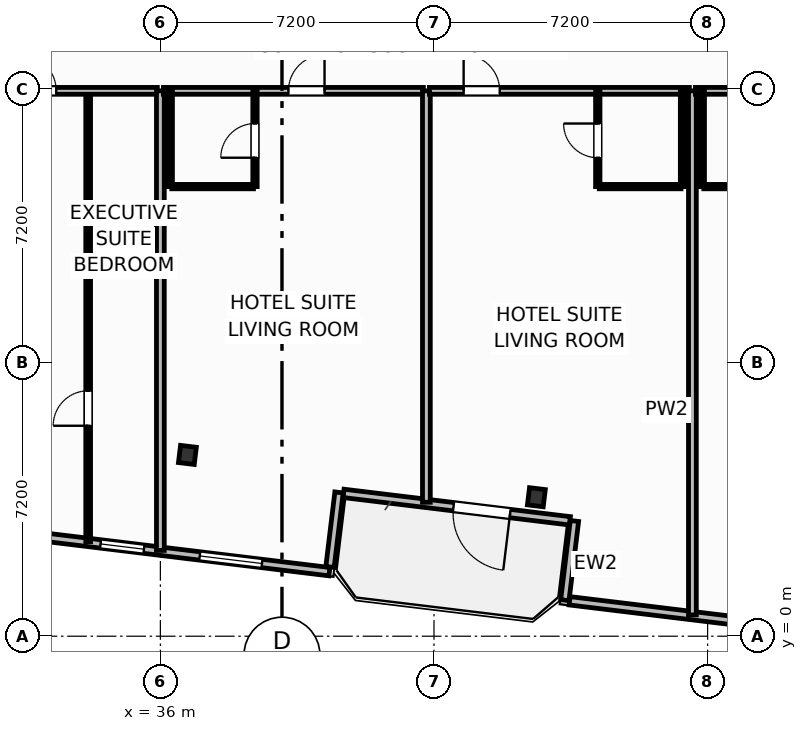
"""IFC4 building model, lengths in metres.
Left out: names, types, materials, properties, quantities, classifications, styles, units other than length and angle.
Written with IfcOpenShell. Run it as: python <this file> out.ifc"""

import sys

from ifc_helpers import new_model, si_unit, direction, frame, frame_2d, origin, origin_2d, place, context, subcontext, project, spatial, rectangle, i_section, extrude, element, fill, save


model = new_model("IFC4")
c1 = context("Model", 3, precision=1e-05, world=origin(), true_north=direction((0.0, 1.0)))
c2 = subcontext(c1, "Body", "Model", "MODEL_VIEW")
j1 = project(units=[si_unit("LENGTHUNIT", "METRE"), si_unit("PLANEANGLEUNIT", "RADIAN")], contexts=[c1])
p1 = place(None, origin())
s1 = spatial("IfcSite", under=j1, at=p1, CompositionType="ELEMENT")
p2 = place(p1, origin())
s2 = spatial("IfcBuilding", under=s1, at=p2, CompositionType="ELEMENT")
p3 = place(p2, frame((0.0, 0.0, 155.0)))
s3 = spatial("IfcBuildingStorey", under=s2, at=p3, CompositionType="ELEMENT", Elevation=155.0)
for number, where, z_axis, x_axis in (
    (1, (36.711, 4.77, 0.0), (0.0, 0.0, 1.0), (0.993, -0.12, 0.0)),
    (2, (45.894, 3.657, 0.0), (0.0, 0.0, 1.0), (0.993, -0.12, 0.0)),
):
    element("IfcColumn", number, at=place(p3, frame(where, z_axis=z_axis, x_axis=x_axis)), inside=s3, PredefinedType="COLUMN", context=c2, shape_type="SweptSolid", body=[
        extrude(i_section(OverallWidth=0.418, OverallDepth=0.455, WebThickness=0.042, FlangeThickness=0.068, FilletRadius=0.025, at=origin_2d()), origin(), (0.0, 0.0, 1.0), 3.7),
    ])
p4 = place(p3, frame((46.776, 3.037, 0.0), z_axis=(0.0, 0.0, 1.0), x_axis=(-0.992735402148, 0.120318000826, 0.0)))
e3 = element("IfcWall", 3, at=p4, inside=s3, PredefinedType="SOLIDWALL", context=c2, shape_type="SweptSolid", body=[
    extrude(rectangle(XDim=6.0, YDim=0.22, at=frame_2d((3.0, 0.0))), origin(), (0.0, 0.0, 1.0), 2.73),
])
p5 = place(p4, frame((1.584, 0.0, 0.0)))
e4 = element("IfcOpeningElement", 4, at=p5, cuts=e3, PredefinedType="OPENING", context=c2, shape_type="SweptSolid", body=[
    extrude(rectangle(XDim=1.5, YDim=2.25, at=frame_2d((0.75, 1.125))), frame((0.0, 0.12, 0.0), z_axis=(0.0, -1.0, 0.0), x_axis=(1.0, 0.0, 0.0)), (0.0, 0.0, 1.0), 0.24),
])
p6 = place(p3, frame((32.472, 2.665, 0.0), z_axis=(0.0, 0.0, 1.0), x_axis=(0.992734661931, -0.120324108143, 0.0)))
e5 = element("IfcWall", 5, at=p6, inside=s3, PredefinedType="SOLIDWALL", context=c2, shape_type="SweptSolid", body=[
    extrude(rectangle(XDim=8.035, YDim=0.22, at=frame_2d((4.018, 0.0))), origin(), (0.0, 0.0, 1.0), 2.73),
])
p7 = place(p6, frame((4.597, 0.0, 0.8)))
e6 = element("IfcOpeningElement", 6, at=p7, cuts=e5, PredefinedType="OPENING", context=c2, shape_type="SweptSolid", body=[
    extrude(rectangle(XDim=1.65, YDim=1.65, at=frame_2d((0.825, 0.825))), frame((0.0, 0.12, 0.0), z_axis=(0.0, -1.0, 0.0), x_axis=(1.0, 0.0, 0.0)), (0.0, 0.0, 1.0), 0.24),
])
p8 = place(p6, frame((1.969, 0.0, 0.8)))
e7 = element("IfcOpeningElement", 7, at=p8, cuts=e5, PredefinedType="OPENING", context=c2, shape_type="SweptSolid", body=[
    extrude(rectangle(XDim=1.15, YDim=1.4, at=frame_2d((0.575, 0.7))), frame((0.0, 0.12, 0.0), z_axis=(0.0, -1.0, 0.0), x_axis=(1.0, 0.0, 0.0)), (0.0, 0.0, 1.0), 0.24),
])
p9 = place(p3, frame((40.464, 1.822, 0.0), z_axis=(0.0, 0.0, 1.0), x_axis=(0.120275992932, 0.992740492538, 0.0)))
e8 = element("IfcWall", 8, at=p9, inside=s3, PredefinedType="SOLIDWALL", context=c2, shape_type="SweptSolid", body=[
    extrude(rectangle(XDim=1.975, YDim=0.22, at=frame_2d((0.988, 0.0))), origin(), (0.0, 0.0, 1.0), 2.73),
])
p10 = place(p3, frame((46.896, 3.032, 0.0), z_axis=(0.0, 0.0, 1.0), x_axis=(-0.120327895535, -0.992734202874, 0.0)))
e9 = element("IfcWall", 9, at=p10, inside=s3, PredefinedType="SOLIDWALL", context=c2, shape_type="SweptSolid", body=[
    extrude(rectangle(XDim=2.1, YDim=0.22, at=frame_2d((1.05, 0.0))), origin(), (0.0, 0.0, 1.0), 2.73),
])
p11 = place(p3, frame((46.768, 0.932, 0.0), z_axis=(0.0, 0.0, 1.0), x_axis=(0.992733036814, -0.120337515419, 0.0)))
e10 = element("IfcWall", 10, at=p11, inside=s3, PredefinedType="SOLIDWALL", context=c2, shape_type="SweptSolid", body=[
    extrude(rectangle(XDim=21.347, YDim=0.22, at=frame_2d((10.673, 0.0))), origin(), (0.0, 0.0, 1.0), 2.73),
])
p12 = place(p11, frame((5.515, 0.0, 0.8)))
e11 = element("IfcOpeningElement", 11, at=p12, cuts=e10, PredefinedType="OPENING", context=c2, shape_type="SweptSolid", body=[
    extrude(rectangle(XDim=1.65, YDim=1.65, at=frame_2d((0.825, 0.825))), frame((0.0, 0.12, 0.0), z_axis=(0.0, -1.0, 0.0), x_axis=(1.0, 0.0, 0.0)), (0.0, 0.0, 1.0), 0.24),
])
p13 = place(p3, frame((34.1, 2.488, 0.0), z_axis=(0.0, 0.0, 1.0), x_axis=(0.0, 1.0, 0.0)))
e12 = element("IfcWall", 12, at=p13, inside=s3, PredefinedType="PARTITIONING", context=c2, shape_type="SweptSolid", body=[
    extrude(rectangle(XDim=11.862, YDim=0.125, at=frame_2d((5.931, 0.0))), origin(), (0.0, 0.0, 1.0), 3.45),
])
p14 = place(p13, frame((3.05, 0.0, 0.0)))
e13 = element("IfcOpeningElement", 13, at=p14, cuts=e12, PredefinedType="OPENING", context=c2, shape_type="SweptSolid", body=[
    extrude(rectangle(XDim=0.92, YDim=2.05, at=frame_2d((0.46, 1.025))), frame((0.0, 0.073, 0.0), z_axis=(0.0, -1.0, 0.0), x_axis=(1.0, 0.0, 0.0)), (0.0, 0.0, 1.0), 0.145),
])
p15 = place(p3, frame((29.08, 14.35, 0.0), z_axis=(0.0, 0.0, 1.0), x_axis=(1.0, 0.0, 0.0)))
e14 = element("IfcWall", 14, at=p15, inside=s3, PredefinedType="PARTITIONING", context=c2, shape_type="SweptSolid", body=[
    extrude(rectangle(XDim=6.84, YDim=0.18, at=frame_2d((3.42, 0.0))), origin(), (0.0, 0.0, 1.0), 3.45),
])
p16 = place(p15, frame((3.23, 0.0, 0.0)))
e15 = element("IfcOpeningElement", 15, at=p16, cuts=e14, PredefinedType="OPENING", context=c2, shape_type="SweptSolid", body=[
    extrude(rectangle(XDim=0.95, YDim=2.15, at=frame_2d((0.475, 1.075))), frame((0.0, 0.1, 0.0), z_axis=(0.0, -1.0, 0.0), x_axis=(1.0, 0.0, 0.0)), (0.0, 0.0, 1.0), 0.2),
])
p17 = place(p3, frame((36.0, 2.258, 0.0), z_axis=(0.0, 0.0, 1.0), x_axis=(0.0, 1.0, 0.0)))
e16 = element("IfcWall", 16, at=p17, inside=s3, PredefinedType="PARTITIONING", context=c2, shape_type="SweptSolid", body=[
    extrude(rectangle(XDim=12.093, YDim=0.205, at=frame_2d((6.046, 0.0))), origin(), (0.0, 0.0, 1.0), 2.662),
])
p18 = place(p3, frame((36.08, 14.35, 0.0), z_axis=(0.0, 0.0, 1.0), x_axis=(1.0, 0.0, 0.0)))
e17 = element("IfcWall", 17, at=p18, inside=s3, PredefinedType="PARTITIONING", context=c2, shape_type="SweptSolid", body=[
    extrude(rectangle(XDim=6.84, YDim=0.18, at=frame_2d((3.42, 0.0))), origin(), (0.0, 0.0, 1.0), 3.45),
])
p19 = place(p18, frame((3.29, 0.0, 0.0)))
e18 = element("IfcOpeningElement", 18, at=p19, cuts=e17, PredefinedType="OPENING", context=c2, shape_type="SweptSolid", body=[
    extrude(rectangle(XDim=0.95, YDim=2.15, at=frame_2d((0.475, 1.075))), frame((0.0, 0.1, 0.0), z_axis=(0.0, -1.0, 0.0), x_axis=(1.0, 0.0, 0.0)), (0.0, 0.0, 1.0), 0.2),
])
p20 = place(p3, frame((36.3, 11.83, 0.0), z_axis=(0.0, 0.0, 1.0), x_axis=(1.0, 0.0, 0.0)))
e19 = element("IfcWall", 19, at=p20, inside=s3, PredefinedType="PARTITIONING", context=c2, shape_type="SweptSolid", body=[
    extrude(rectangle(XDim=2.15, YDim=0.115, at=frame_2d((1.075, 0.0))), origin(), (0.0, 0.0, 1.0), 3.45),
])
p21 = place(p3, frame((38.49, 11.83, 0.0), z_axis=(0.0, 0.0, 1.0), x_axis=(0.0, 1.0, 0.0)))
e20 = element("IfcWall", 20, at=p21, inside=s3, PredefinedType="PARTITIONING", context=c2, shape_type="SweptSolid", body=[
    extrude(rectangle(XDim=2.52, YDim=0.115, at=frame_2d((1.26, 0.0))), origin(), (0.0, 0.0, 1.0), 3.45),
])
p22 = place(p21, frame((0.76, 0.0, 0.0)))
e21 = element("IfcOpeningElement", 21, at=p22, cuts=e20, PredefinedType="OPENING", context=c2, shape_type="SweptSolid", body=[
    extrude(rectangle(XDim=0.9, YDim=2.05, at=frame_2d((0.45, 1.025))), frame((0.0, 0.067, 0.0), z_axis=(0.0, -1.0, 0.0), x_axis=(1.0, 0.0, 0.0)), (0.0, 0.0, 1.0), 0.135),
])
p23 = place(p3, frame((36.26, 11.83, 0.0), z_axis=(0.0, 0.0, 1.0), x_axis=(0.0, 1.0, 0.0)))
e22 = element("IfcWall", 22, at=p23, inside=s3, PredefinedType="PARTITIONING", context=c2, shape_type="SweptSolid", body=[
    extrude(rectangle(XDim=2.52, YDim=0.115, at=frame_2d((1.26, 0.0))), origin(), (0.0, 0.0, 1.0), 3.45),
])
p24 = place(p3, frame((43.0, 3.524, 0.0), z_axis=(0.0, 0.0, 1.0), x_axis=(0.0, 1.0, 0.0)))
e23 = element("IfcWall", 23, at=p24, inside=s3, PredefinedType="PARTITIONING", context=c2, shape_type="SweptSolid", body=[
    extrude(rectangle(XDim=10.826, YDim=0.205, at=frame_2d((5.413, 0.0))), origin(), (0.0, 0.0, 1.0), 3.45),
])
p25 = place(p3, frame((43.08, 14.35, 0.0), z_axis=(0.0, 0.0, 1.0), x_axis=(1.0, 0.0, 0.0)))
e24 = element("IfcWall", 24, at=p25, inside=s3, PredefinedType="PARTITIONING", context=c2, shape_type="SweptSolid", body=[
    extrude(rectangle(XDim=6.84, YDim=0.18, at=frame_2d((3.42, 0.0))), origin(), (0.0, 0.0, 1.0), 3.45),
])
p26 = place(p25, frame((0.9, 0.0, 0.0)))
e25 = element("IfcOpeningElement", 25, at=p26, cuts=e24, PredefinedType="OPENING", context=c2, shape_type="SweptSolid", body=[
    extrude(rectangle(XDim=0.95, YDim=2.15, at=frame_2d((0.475, 1.075))), frame((0.0, 0.1, 0.0), z_axis=(0.0, -1.0, 0.0), x_axis=(1.0, 0.0, 0.0)), (0.0, 0.0, 1.0), 0.2),
])
p27 = place(p3, frame((47.55, 11.83, 0.0), z_axis=(0.0, 0.0, 1.0), x_axis=(1.0, 0.0, 0.0)))
e26 = element("IfcWall", 26, at=p27, inside=s3, PredefinedType="PARTITIONING", context=c2, shape_type="SweptSolid", body=[
    extrude(rectangle(XDim=2.15, YDim=0.115, at=frame_2d((1.075, 0.0))), origin(), (0.0, 0.0, 1.0), 3.45),
])
p28 = place(p3, frame((47.51, 11.83, 0.0), z_axis=(0.0, 0.0, 1.0), x_axis=(0.0, 1.0, 0.0)))
e27 = element("IfcWall", 27, at=p28, inside=s3, PredefinedType="PARTITIONING", context=c2, shape_type="SweptSolid", body=[
    extrude(rectangle(XDim=2.52, YDim=0.115, at=frame_2d((1.26, 0.0))), origin(), (0.0, 0.0, 1.0), 3.45),
])
p29 = place(p28, frame((0.76, 0.0, 0.0)))
e28 = element("IfcOpeningElement", 28, at=p29, cuts=e27, PredefinedType="OPENING", context=c2, shape_type="SweptSolid", body=[
    extrude(rectangle(XDim=0.9, YDim=2.05, at=frame_2d((0.45, 1.025))), frame((0.0, 0.067, 0.0), z_axis=(0.0, -1.0, 0.0), x_axis=(1.0, 0.0, 0.0)), (0.0, 0.0, 1.0), 0.135),
])
p30 = place(p3, frame((49.74, 11.83, 0.0), z_axis=(0.0, 0.0, 1.0), x_axis=(0.0, 1.0, 0.0)))
e29 = element("IfcWall", 29, at=p30, inside=s3, PredefinedType="PARTITIONING", context=c2, shape_type="SweptSolid", body=[
    extrude(rectangle(XDim=2.52, YDim=0.115, at=frame_2d((1.26, 0.0))), origin(), (0.0, 0.0, 1.0), 3.45),
])
p31 = place(p3, frame((50.0, 0.561, 0.0), z_axis=(0.0, 0.0, 1.0), x_axis=(0.0, 1.0, 0.0)))
e30 = element("IfcWall", 30, at=p31, inside=s3, PredefinedType="PARTITIONING", context=c2, shape_type="SweptSolid", body=[
    extrude(rectangle(XDim=13.79, YDim=0.205, at=frame_2d((6.895, 0.0))), origin(), (0.0, 0.0, 1.0), 3.45),
])
p32 = place(p3, frame((50.08, 14.35, 0.0), z_axis=(0.0, 0.0, 1.0), x_axis=(1.0, 0.0, 0.0)))
e31 = element("IfcWall", 31, at=p32, inside=s3, PredefinedType="PARTITIONING", context=c2, shape_type="SweptSolid", body=[
    extrude(rectangle(XDim=6.84, YDim=0.18, at=frame_2d((3.42, 0.0))), origin(), (0.0, 0.0, 1.0), 3.45),
])
p33 = place(p32, frame((3.29, 0.0, 0.0)))
e32 = element("IfcOpeningElement", 32, at=p33, cuts=e31, PredefinedType="OPENING", context=c2, shape_type="SweptSolid", body=[
    extrude(rectangle(XDim=0.95, YDim=2.15, at=frame_2d((0.475, 1.075))), frame((0.0, 0.1, 0.0), z_axis=(0.0, -1.0, 0.0), x_axis=(1.0, 0.0, 0.0)), (0.0, 0.0, 1.0), 0.2),
])
p34 = place(p3, frame((50.3, 11.83, 0.0), z_axis=(0.0, 0.0, 1.0), x_axis=(1.0, 0.0, 0.0)))
e33 = element("IfcWall", 33, at=p34, inside=s3, PredefinedType="PARTITIONING", context=c2, shape_type="SweptSolid", body=[
    extrude(rectangle(XDim=2.15, YDim=0.115, at=frame_2d((1.075, 0.0))), origin(), (0.0, 0.0, 1.0), 3.45),
])
p35 = place(p3, frame((50.26, 11.83, 0.0), z_axis=(0.0, 0.0, 1.0), x_axis=(0.0, 1.0, 0.0)))
e34 = element("IfcWall", 34, at=p35, inside=s3, PredefinedType="PARTITIONING", context=c2, shape_type="SweptSolid", body=[
    extrude(rectangle(XDim=2.52, YDim=0.115, at=frame_2d((1.26, 0.0))), origin(), (0.0, 0.0, 1.0), 3.45),
])
p36 = place(p5, origin())
e35 = element("IfcDoor", 35, at=p36, inside=s3, OperationType="SINGLE_SWING_LEFT", PredefinedType="DOOR", context=c2, shape_type="SweptSolid", body=[
    extrude(rectangle(XDim=1.5, YDim=2.25, at=frame_2d((0.75, 1.125))), frame((0.0, 0.025, 0.0), z_axis=(0.0, -1.0, 0.0), x_axis=(1.0, 0.0, 0.0)), (0.0, 0.0, 1.0), 0.05),
])
fill(e4, e35)
p37 = place(p7, origin())
e36 = element("IfcWindow", 36, at=p37, inside=s3, PartitioningType="SINGLE_PANEL", PredefinedType="WINDOW", context=c2, shape_type="SweptSolid", body=[
    extrude(rectangle(XDim=1.65, YDim=1.65, at=frame_2d((0.825, 0.825))), frame((0.0, 0.03, 0.0), z_axis=(0.0, -1.0, 0.0), x_axis=(1.0, 0.0, 0.0)), (0.0, 0.0, 1.0), 0.06),
])
fill(e6, e36)
p38 = place(p14, origin())
e37 = element("IfcDoor", 37, at=p38, inside=s3, OperationType="SINGLE_SWING_LEFT", PredefinedType="DOOR", context=c2, shape_type="SweptSolid", body=[
    extrude(rectangle(XDim=0.92, YDim=2.05, at=frame_2d((0.46, 1.025))), frame((0.0, 0.025, 0.0), z_axis=(0.0, -1.0, 0.0), x_axis=(1.0, 0.0, 0.0)), (0.0, 0.0, 1.0), 0.05),
])
fill(e13, e37)
p39 = place(p16, origin())
e38 = element("IfcDoor", 38, at=p39, inside=s3, OperationType="SINGLE_SWING_LEFT", PredefinedType="DOOR", context=c2, shape_type="SweptSolid", body=[
    extrude(rectangle(XDim=0.95, YDim=2.15, at=frame_2d((0.475, 1.075))), frame((0.0, 0.025, 0.0), z_axis=(0.0, -1.0, 0.0), x_axis=(1.0, 0.0, 0.0)), (0.0, 0.0, 1.0), 0.05),
])
fill(e15, e38)
p40 = place(p19, origin())
e39 = element("IfcDoor", 39, at=p40, inside=s3, OperationType="SINGLE_SWING_RIGHT", PredefinedType="DOOR", context=c2, shape_type="SweptSolid", body=[
    extrude(rectangle(XDim=0.95, YDim=2.15, at=frame_2d((0.475, 1.075))), frame((0.0, 0.025, 0.0), z_axis=(0.0, -1.0, 0.0), x_axis=(1.0, 0.0, 0.0)), (0.0, 0.0, 1.0), 0.05),
])
fill(e18, e39)
p41 = place(p22, origin())
e40 = element("IfcDoor", 40, at=p41, inside=s3, OperationType="SINGLE_SWING_LEFT", PredefinedType="DOOR", context=c2, shape_type="SweptSolid", body=[
    extrude(rectangle(XDim=0.9, YDim=2.05, at=frame_2d((0.45, 1.025))), frame((0.0, 0.025, 0.0), z_axis=(0.0, -1.0, 0.0), x_axis=(1.0, 0.0, 0.0)), (0.0, 0.0, 1.0), 0.05),
])
fill(e21, e40)
p42 = place(p26, origin())
e41 = element("IfcDoor", 41, at=p42, inside=s3, OperationType="SINGLE_SWING_LEFT", PredefinedType="DOOR", context=c2, shape_type="SweptSolid", body=[
    extrude(rectangle(XDim=0.95, YDim=2.15, at=frame_2d((0.475, 1.075))), frame((0.0, 0.025, 0.0), z_axis=(0.0, -1.0, 0.0), x_axis=(1.0, 0.0, 0.0)), (0.0, 0.0, 1.0), 0.05),
])
fill(e25, e41)
p43 = place(p29, origin())
e42 = element("IfcDoor", 42, at=p43, inside=s3, OperationType="SINGLE_SWING_RIGHT", PredefinedType="DOOR", context=c2, shape_type="SweptSolid", body=[
    extrude(rectangle(XDim=0.9, YDim=2.05, at=frame_2d((0.45, 1.025))), frame((0.0, 0.025, 0.0), z_axis=(0.0, -1.0, 0.0), x_axis=(1.0, 0.0, 0.0)), (0.0, 0.0, 1.0), 0.05),
])
fill(e28, e42)
p44 = place(p8, origin())
e43 = element("IfcWindow", 43, at=p44, inside=s3, PartitioningType="SINGLE_PANEL", PredefinedType="WINDOW", context=c2, shape_type="SweptSolid", body=[
    extrude(rectangle(XDim=1.15, YDim=1.4, at=frame_2d((0.575, 0.7))), frame((0.0, 0.03, 0.0), z_axis=(0.0, -1.0, 0.0), x_axis=(1.0, 0.0, 0.0)), (0.0, 0.0, 1.0), 0.06),
])
fill(e7, e43)
save(model, sys.argv[1])
